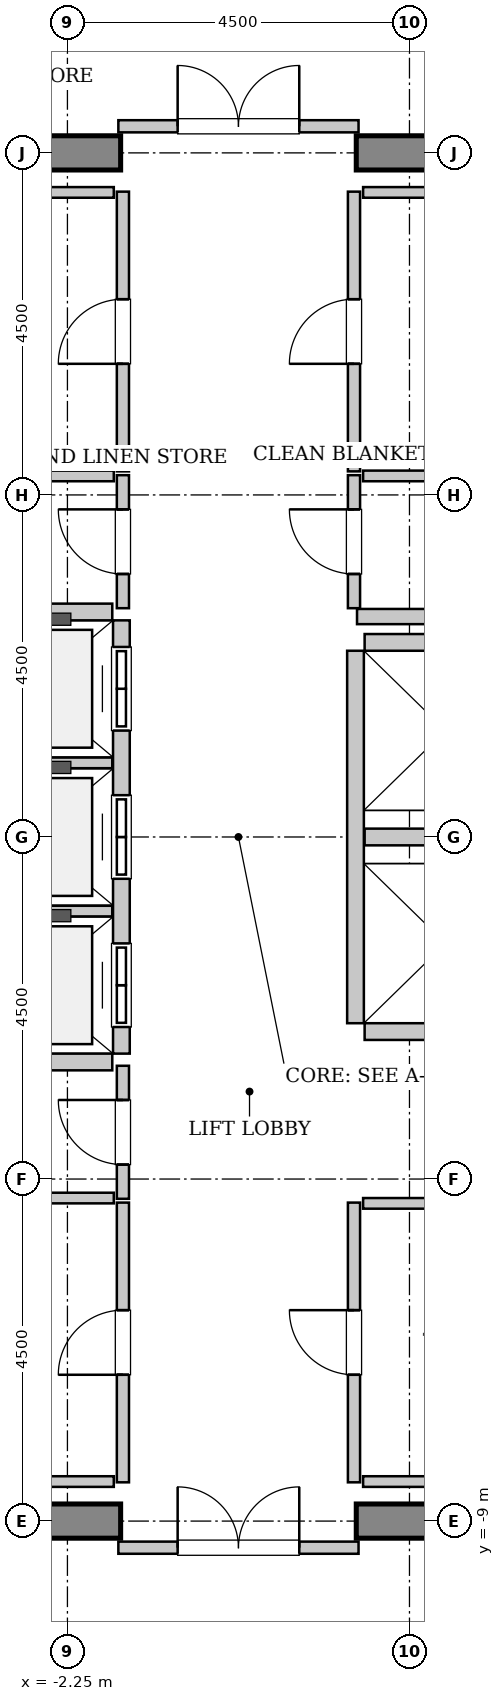
"""IFC4 building model, lengths in metres.
Left out: names, types, materials, properties, quantities, classifications, styles, units other than length and angle.
Written with IfcOpenShell. Run it as: python <this file> out.ifc"""

import sys

from ifc_helpers import new_model, si_unit, direction, frame, frame_2d, origin, place, context, subcontext, project, spatial, rectangle, extrude, source, transform, mapped, element, fill, save


model = new_model("IFC4")
c1 = context("Model", 3, precision=1e-05, world=origin(), true_north=direction((0.0, 1.0)))
c2 = subcontext(c1, "Body", "Model", "MODEL_VIEW")
j1 = project(units=[si_unit("LENGTHUNIT", "METRE"), si_unit("PLANEANGLEUNIT", "RADIAN")], contexts=[c1])
p1 = place(None, origin())
s1 = spatial("IfcSite", under=j1, at=p1, CompositionType="ELEMENT")
p2 = place(p1, origin())
s2 = spatial("IfcBuilding", under=s1, at=p2, CompositionType="ELEMENT")
p3 = place(p2, frame((0.0, 0.0, 279.8)))
s3 = spatial("IfcBuildingStorey", under=s2, at=p3, CompositionType="ELEMENT", Elevation=279.8)
m1 = source(origin(), c2, "Body", "SweptSolid", [
    extrude(rectangle(XDim=9.925, YDim=0.45, at=frame_2d((4.962, 0.0))), origin(), (0.0, 0.0, 1.0), 3.8),
])
for number, where, z_axis, x_axis in (
    (1, (-11.475, 9.0, 0.0), (0.0, 0.0, 1.0), (1.0, 0.0, 0.0)),
    (2, (1.55, 9.0, 0.0), (0.0, 0.0, 1.0), (1.0, 0.0, 0.0)),
    (3, (-11.475, -9.0, 0.0), (0.0, 0.0, 1.0), (1.0, 0.0, 0.0)),
    (4, (1.55, -9.0, 0.0), (0.0, 0.0, 1.0), (1.0, 0.0, 0.0)),
):
    element("IfcWall", number, at=place(p3, frame(where, z_axis=z_axis, x_axis=x_axis)), inside=s3, PredefinedType="SHEAR", context=c2, shape_type="MappedRepresentation", body=[
        mapped(m1, transform((0.0, 0.0, 0.0), x_axis=(1.0, 0.0, 0.0), y_axis=(0.0, 1.0, 0.0), z_axis=(0.0, 0.0, 1.0), scale=1.0)),
    ])
m2 = source(origin(), c2, "Body", "SweptSolid", [
    extrude(rectangle(XDim=5.7, YDim=0.22, at=frame_2d((2.85, 0.0))), origin(), (0.0, 0.0, 1.0), 3.535),
])
p4 = place(p3, frame((-1.54, -2.85, 0.0), z_axis=(0.0, 0.0, 1.0), x_axis=(0.0, 1.0, 0.0)))
e5 = element("IfcWall", 5, at=p4, inside=s3, PredefinedType="SOLIDWALL", context=c2, shape_type="MappedRepresentation", body=[
    mapped(m2, transform((0.0, 0.0, 0.0), x_axis=(1.0, 0.0, 0.0), y_axis=(0.0, 1.0, 0.0), z_axis=(0.0, 0.0, 1.0), scale=1.0)),
])
p5 = place(p4, frame((0.35, 0.0, 0.0)))
e6 = element("IfcOpeningElement", 6, at=p5, cuts=e5, PredefinedType="OPENING", context=c2, shape_type="SweptSolid", body=[
    extrude(rectangle(XDim=1.1, YDim=2.2, at=frame_2d((0.55, 1.1))), frame((0.0, 0.12, 0.0), z_axis=(0.0, -1.0, 0.0), x_axis=(1.0, 0.0, 0.0)), (0.0, 0.0, 1.0), 0.24),
])
p6 = place(p4, frame((2.3, 0.0, 0.0)))
e7 = element("IfcOpeningElement", 7, at=p6, cuts=e5, PredefinedType="OPENING", context=c2, shape_type="SweptSolid", body=[
    extrude(rectangle(XDim=1.1, YDim=2.2, at=frame_2d((0.55, 1.1))), frame((0.0, 0.12, 0.0), z_axis=(0.0, -1.0, 0.0), x_axis=(1.0, 0.0, 0.0)), (0.0, 0.0, 1.0), 0.24),
])
p7 = place(p4, frame((4.25, 0.0, 0.0)))
e8 = element("IfcOpeningElement", 8, at=p7, cuts=e5, PredefinedType="OPENING", context=c2, shape_type="SweptSolid", body=[
    extrude(rectangle(XDim=1.1, YDim=2.2, at=frame_2d((0.55, 1.1))), frame((0.0, 0.12, 0.0), z_axis=(0.0, -1.0, 0.0), x_axis=(1.0, 0.0, 0.0)), (0.0, 0.0, 1.0), 0.24),
])
m3 = source(origin(), c2, "Body", "SweptSolid", [
    extrude(rectangle(XDim=2.13, YDim=0.22, at=frame_2d((1.065, 0.0))), origin(), (0.0, 0.0, 1.0), 3.535),
])
p8 = place(p3, frame((-3.79, -2.96, 0.0), z_axis=(0.0, 0.0, 1.0), x_axis=(1.0, 0.0, 0.0)))
e9 = element("IfcWall", 9, at=p8, inside=s3, PredefinedType="SOLIDWALL", context=c2, shape_type="MappedRepresentation", body=[
    mapped(m3, transform((0.0, 0.0, 0.0), x_axis=(1.0, 0.0, 0.0), y_axis=(0.0, 1.0, 0.0), z_axis=(0.0, 0.0, 1.0), scale=1.0)),
])
m4 = source(origin(), c2, "Body", "SweptSolid", [
    extrude(rectangle(XDim=2.13, YDim=0.14, at=frame_2d((1.065, 0.0))), origin(), (0.0, 0.0, 1.0), 3.535),
])
for number, where, z_axis, x_axis in (
    (10, (-3.79, -0.975, 0.0), (0.0, 0.0, 1.0), (1.0, 0.0, 0.0)),
    (11, (-3.79, 0.975, 0.0), (0.0, 0.0, 1.0), (1.0, 0.0, 0.0)),
):
    element("IfcWall", number, at=place(p3, frame(where, z_axis=z_axis, x_axis=x_axis)), inside=s3, PredefinedType="PARTITIONING", context=c2, shape_type="MappedRepresentation", body=[
        mapped(m4, transform((0.0, 0.0, 0.0), x_axis=(1.0, 0.0, 0.0), y_axis=(0.0, 1.0, 0.0), z_axis=(0.0, 0.0, 1.0), scale=1.0)),
    ])
p9 = place(p3, frame((-1.66, 2.96, 0.0), z_axis=(0.0, 0.0, 1.0), x_axis=(-1.0, 0.0, 0.0)))
e12 = element("IfcWall", 12, at=p9, inside=s3, PredefinedType="SOLIDWALL", context=c2, shape_type="MappedRepresentation", body=[
    mapped(m3, transform((0.0, 0.0, 0.0), x_axis=(1.0, 0.0, 0.0), y_axis=(0.0, 1.0, 0.0), z_axis=(0.0, 0.0, 1.0), scale=1.0)),
])
m5 = source(origin(), c2, "Body", "SweptSolid", [
    extrude(rectangle(XDim=4.9, YDim=0.22, at=frame_2d((2.45, 0.0))), origin(), (0.0, 0.0, 1.0), 3.535),
])
p10 = place(p3, frame((1.54, 2.45, 0.0), z_axis=(0.0, 0.0, 1.0), x_axis=(0.0, -1.0, 0.0)))
e13 = element("IfcWall", 13, at=p10, inside=s3, PredefinedType="SOLIDWALL", context=c2, shape_type="MappedRepresentation", body=[
    mapped(m5, transform((0.0, 0.0, 0.0), x_axis=(1.0, 0.0, 0.0), y_axis=(0.0, 1.0, 0.0), z_axis=(0.0, 0.0, 1.0), scale=1.0)),
])
for number, where, z_axis, x_axis in (
    (14, (1.66, -2.56, 0.0), (0.0, 0.0, 1.0), (1.0, 0.0, 0.0)),
    (15, (1.66, 0.0, 0.0), (0.0, 0.0, 1.0), (1.0, 0.0, 0.0)),
    (16, (3.79, 2.56, 0.0), (0.0, 0.0, 1.0), (-1.0, 0.0, 0.0)),
):
    element("IfcWall", number, at=place(p3, frame(where, z_axis=z_axis, x_axis=x_axis)), inside=s3, PredefinedType="SOLIDWALL", context=c2, shape_type="MappedRepresentation", body=[
        mapped(m3, transform((0.0, 0.0, 0.0), x_axis=(1.0, 0.0, 0.0), y_axis=(0.0, 1.0, 0.0), z_axis=(0.0, 0.0, 1.0), scale=1.0)),
    ])
m6 = source(origin(), c2, "Body", "SweptSolid", [
    extrude(rectangle(XDim=2.52, YDim=0.2, at=frame_2d((1.26, 0.0))), origin(), (0.0, 0.0, 1.0), 3.535),
])
p11 = place(p3, frame((1.56, 2.9, 0.0), z_axis=(0.0, 0.0, 1.0), x_axis=(1.0, 0.0, 0.0)))
e17 = element("IfcWall", 17, at=p11, inside=s3, PredefinedType="PARTITIONING", context=c2, shape_type="MappedRepresentation", body=[
    mapped(m6, transform((0.0, 0.0, 0.0), x_axis=(1.0, 0.0, 0.0), y_axis=(0.0, 1.0, 0.0), z_axis=(0.0, 0.0, 1.0), scale=1.0)),
])
m7 = source(origin(), c2, "Body", "SweptSolid", [
    extrude(rectangle(XDim=3.16, YDim=0.16, at=frame_2d((1.58, 0.0))), origin(), (0.0, 0.0, 1.0), 2.625),
])
p12 = place(p3, frame((-1.58, 9.35, 0.0), z_axis=(0.0, 0.0, 1.0), x_axis=(1.0, 0.0, 0.0)))
e18 = element("IfcWall", 18, at=p12, inside=s3, PredefinedType="PARTITIONING", context=c2, shape_type="MappedRepresentation", body=[
    mapped(m7, transform((0.0, 0.0, 0.0), x_axis=(1.0, 0.0, 0.0), y_axis=(0.0, 1.0, 0.0), z_axis=(0.0, 0.0, 1.0), scale=1.0)),
])
p13 = place(p12, frame((0.78, 0.0, 0.0)))
e19 = element("IfcOpeningElement", 19, at=p13, cuts=e18, PredefinedType="OPENING", context=c2, shape_type="SweptSolid", body=[
    extrude(rectangle(XDim=1.6, YDim=2.3, at=frame_2d((0.8, 1.15))), frame((0.0, 0.09, 0.0), z_axis=(0.0, -1.0, 0.0), x_axis=(1.0, 0.0, 0.0)), (0.0, 0.0, 1.0), 0.18),
])
p14 = place(p3, frame((-1.58, -9.35, 0.0), z_axis=(0.0, 0.0, 1.0), x_axis=(1.0, 0.0, 0.0)))
e20 = element("IfcWall", 20, at=p14, inside=s3, PredefinedType="PARTITIONING", context=c2, shape_type="MappedRepresentation", body=[
    mapped(m7, transform((0.0, 0.0, 0.0), x_axis=(1.0, 0.0, 0.0), y_axis=(0.0, 1.0, 0.0), z_axis=(0.0, 0.0, 1.0), scale=1.0)),
])
p15 = place(p14, frame((0.78, 0.0, 0.0)))
e21 = element("IfcOpeningElement", 21, at=p15, cuts=e20, PredefinedType="OPENING", context=c2, shape_type="SweptSolid", body=[
    extrude(rectangle(XDim=1.6, YDim=2.3, at=frame_2d((0.8, 1.15))), frame((0.0, 0.09, 0.0), z_axis=(0.0, -1.0, 0.0), x_axis=(1.0, 0.0, 0.0)), (0.0, 0.0, 1.0), 0.18),
])
m8 = source(origin(), c2, "Body", "SweptSolid", [
    extrude(rectangle(XDim=1.75, YDim=0.16, at=frame_2d((0.875, 0.0))), origin(), (0.0, 0.0, 1.0), 3.535),
])
p16 = place(p3, frame((-1.52, 3.01, 0.0), z_axis=(0.0, 0.0, 1.0), x_axis=(0.0, 1.0, 0.0)))
e22 = element("IfcWall", 22, at=p16, inside=s3, PredefinedType="PARTITIONING", context=c2, shape_type="MappedRepresentation", body=[
    mapped(m8, transform((0.0, 0.0, 0.0), x_axis=(1.0, 0.0, 0.0), y_axis=(0.0, 1.0, 0.0), z_axis=(0.0, 0.0, 1.0), scale=1.0)),
])
p17 = place(p16, frame((0.45, 0.0, 0.0)))
e23 = element("IfcOpeningElement", 23, at=p17, cuts=e22, PredefinedType="OPENING", context=c2, shape_type="SweptSolid", body=[
    extrude(rectangle(XDim=0.85, YDim=2.1, at=frame_2d((0.425, 1.05))), frame((0.0, 0.09, 0.0), z_axis=(0.0, -1.0, 0.0), x_axis=(1.0, 0.0, 0.0)), (0.0, 0.0, 1.0), 0.18),
])
m9 = source(origin(), c2, "Body", "SweptSolid", [
    extrude(rectangle(XDim=2.95, YDim=0.14, at=frame_2d((1.475, 0.0))), origin(), (0.0, 0.0, 1.0), 3.535),
])
p18 = place(p3, frame((-4.59, 4.75, 0.0), z_axis=(0.0, 0.0, 1.0), x_axis=(1.0, 0.0, 0.0)))
e24 = element("IfcWall", 24, at=p18, inside=s3, PredefinedType="PARTITIONING", context=c2, shape_type="MappedRepresentation", body=[
    mapped(m9, transform((0.0, 0.0, 0.0), x_axis=(1.0, 0.0, 0.0), y_axis=(0.0, 1.0, 0.0), z_axis=(0.0, 0.0, 1.0), scale=1.0)),
])
m10 = source(origin(), c2, "Body", "SweptSolid", [
    extrude(rectangle(XDim=3.68, YDim=0.16, at=frame_2d((1.84, 0.0))), origin(), (0.0, 0.0, 1.0), 3.535),
])
p19 = place(p3, frame((-1.52, 4.81, 0.0), z_axis=(0.0, 0.0, 1.0), x_axis=(0.0, 1.0, 0.0)))
e25 = element("IfcWall", 25, at=p19, inside=s3, PredefinedType="PARTITIONING", context=c2, shape_type="MappedRepresentation", body=[
    mapped(m10, transform((0.0, 0.0, 0.0), x_axis=(1.0, 0.0, 0.0), y_axis=(0.0, 1.0, 0.0), z_axis=(0.0, 0.0, 1.0), scale=1.0)),
])
p20 = place(p19, frame((1.415, 0.0, 0.0)))
e26 = element("IfcOpeningElement", 26, at=p20, cuts=e25, PredefinedType="OPENING", context=c2, shape_type="SweptSolid", body=[
    extrude(rectangle(XDim=0.85, YDim=2.1, at=frame_2d((0.425, 1.05))), frame((0.0, 0.09, 0.0), z_axis=(0.0, -1.0, 0.0), x_axis=(1.0, 0.0, 0.0)), (0.0, 0.0, 1.0), 0.18),
])
m11 = source(origin(), c2, "Body", "SweptSolid", [
    extrude(rectangle(XDim=3.15, YDim=0.14, at=frame_2d((1.575, 0.0))), origin(), (0.0, 0.0, 1.0), 3.535),
])
p21 = place(p3, frame((-4.79, 8.48, 0.0), z_axis=(0.0, 0.0, 1.0), x_axis=(1.0, 0.0, 0.0)))
e27 = element("IfcWall", 27, at=p21, inside=s3, PredefinedType="PARTITIONING", context=c2, shape_type="MappedRepresentation", body=[
    mapped(m11, transform((0.0, 0.0, 0.0), x_axis=(1.0, 0.0, 0.0), y_axis=(0.0, 1.0, 0.0), z_axis=(0.0, 0.0, 1.0), scale=1.0)),
])
p22 = place(p3, frame((1.52, 3.01, 0.0), z_axis=(0.0, 0.0, 1.0), x_axis=(0.0, 1.0, 0.0)))
e28 = element("IfcWall", 28, at=p22, inside=s3, PredefinedType="PARTITIONING", context=c2, shape_type="MappedRepresentation", body=[
    mapped(m8, transform((0.0, 0.0, 0.0), x_axis=(1.0, 0.0, 0.0), y_axis=(0.0, 1.0, 0.0), z_axis=(0.0, 0.0, 1.0), scale=1.0)),
])
p23 = place(p22, frame((0.45, 0.0, 0.0)))
e29 = element("IfcOpeningElement", 29, at=p23, cuts=e28, PredefinedType="OPENING", context=c2, shape_type="SweptSolid", body=[
    extrude(rectangle(XDim=0.85, YDim=2.1, at=frame_2d((0.425, 1.05))), frame((0.0, 0.09, 0.0), z_axis=(0.0, -1.0, 0.0), x_axis=(1.0, 0.0, 0.0)), (0.0, 0.0, 1.0), 0.18),
])
p24 = place(p3, frame((1.64, 4.75, 0.0), z_axis=(0.0, 0.0, 1.0), x_axis=(1.0, 0.0, 0.0)))
e30 = element("IfcWall", 30, at=p24, inside=s3, PredefinedType="PARTITIONING", context=c2, shape_type="MappedRepresentation", body=[
    mapped(m11, transform((0.0, 0.0, 0.0), x_axis=(1.0, 0.0, 0.0), y_axis=(0.0, 1.0, 0.0), z_axis=(0.0, 0.0, 1.0), scale=1.0)),
])
p25 = place(p3, frame((1.52, 4.81, 0.0), z_axis=(0.0, 0.0, 1.0), x_axis=(0.0, 1.0, 0.0)))
e31 = element("IfcWall", 31, at=p25, inside=s3, PredefinedType="PARTITIONING", context=c2, shape_type="MappedRepresentation", body=[
    mapped(m10, transform((0.0, 0.0, 0.0), x_axis=(1.0, 0.0, 0.0), y_axis=(0.0, 1.0, 0.0), z_axis=(0.0, 0.0, 1.0), scale=1.0)),
])
p26 = place(p25, frame((1.415, 0.0, 0.0)))
e32 = element("IfcOpeningElement", 32, at=p26, cuts=e31, PredefinedType="OPENING", context=c2, shape_type="SweptSolid", body=[
    extrude(rectangle(XDim=0.85, YDim=2.1, at=frame_2d((0.425, 1.05))), frame((0.0, 0.09, 0.0), z_axis=(0.0, -1.0, 0.0), x_axis=(1.0, 0.0, 0.0)), (0.0, 0.0, 1.0), 0.18),
])
p27 = place(p3, frame((1.64, 8.48, 0.0), z_axis=(0.0, 0.0, 1.0), x_axis=(1.0, 0.0, 0.0)))
e33 = element("IfcWall", 33, at=p27, inside=s3, PredefinedType="PARTITIONING", context=c2, shape_type="MappedRepresentation", body=[
    mapped(m11, transform((0.0, 0.0, 0.0), x_axis=(1.0, 0.0, 0.0), y_axis=(0.0, 1.0, 0.0), z_axis=(0.0, 0.0, 1.0), scale=1.0)),
])
p28 = place(p3, frame((-1.52, -4.76, 0.0), z_axis=(0.0, 0.0, 1.0), x_axis=(0.0, 1.0, 0.0)))
e34 = element("IfcWall", 34, at=p28, inside=s3, PredefinedType="PARTITIONING", context=c2, shape_type="MappedRepresentation", body=[
    mapped(m8, transform((0.0, 0.0, 0.0), x_axis=(1.0, 0.0, 0.0), y_axis=(0.0, 1.0, 0.0), z_axis=(0.0, 0.0, 1.0), scale=1.0)),
])
p29 = place(p28, frame((0.45, 0.0, 0.0)))
e35 = element("IfcOpeningElement", 35, at=p29, cuts=e34, PredefinedType="OPENING", context=c2, shape_type="SweptSolid", body=[
    extrude(rectangle(XDim=0.85, YDim=2.1, at=frame_2d((0.425, 1.05))), frame((0.0, 0.09, 0.0), z_axis=(0.0, -1.0, 0.0), x_axis=(1.0, 0.0, 0.0)), (0.0, 0.0, 1.0), 0.18),
])
p30 = place(p3, frame((-4.79, -4.75, 0.0), z_axis=(0.0, 0.0, 1.0), x_axis=(1.0, 0.0, 0.0)))
e36 = element("IfcWall", 36, at=p30, inside=s3, PredefinedType="PARTITIONING", context=c2, shape_type="MappedRepresentation", body=[
    mapped(m11, transform((0.0, 0.0, 0.0), x_axis=(1.0, 0.0, 0.0), y_axis=(0.0, 1.0, 0.0), z_axis=(0.0, 0.0, 1.0), scale=1.0)),
])
p31 = place(p3, frame((-1.52, -8.49, 0.0), z_axis=(0.0, 0.0, 1.0), x_axis=(0.0, 1.0, 0.0)))
e37 = element("IfcWall", 37, at=p31, inside=s3, PredefinedType="PARTITIONING", context=c2, shape_type="MappedRepresentation", body=[
    mapped(m10, transform((0.0, 0.0, 0.0), x_axis=(1.0, 0.0, 0.0), y_axis=(0.0, 1.0, 0.0), z_axis=(0.0, 0.0, 1.0), scale=1.0)),
])
p32 = place(p31, frame((1.415, 0.0, 0.0)))
e38 = element("IfcOpeningElement", 38, at=p32, cuts=e37, PredefinedType="OPENING", context=c2, shape_type="SweptSolid", body=[
    extrude(rectangle(XDim=0.85, YDim=2.1, at=frame_2d((0.425, 1.05))), frame((0.0, 0.09, 0.0), z_axis=(0.0, -1.0, 0.0), x_axis=(1.0, 0.0, 0.0)), (0.0, 0.0, 1.0), 0.18),
])
m12 = source(origin(), c2, "Body", "SweptSolid", [
    extrude(rectangle(XDim=3.03, YDim=0.14, at=frame_2d((1.515, 0.0))), origin(), (0.0, 0.0, 1.0), 3.535),
])
p33 = place(p3, frame((-4.67, -8.48, 0.0), z_axis=(0.0, 0.0, 1.0), x_axis=(1.0, 0.0, 0.0)))
e39 = element("IfcWall", 39, at=p33, inside=s3, PredefinedType="PARTITIONING", context=c2, shape_type="MappedRepresentation", body=[
    mapped(m12, transform((0.0, 0.0, 0.0), x_axis=(1.0, 0.0, 0.0), y_axis=(0.0, 1.0, 0.0), z_axis=(0.0, 0.0, 1.0), scale=1.0)),
])
p34 = place(p3, frame((1.52, -8.49, 0.0), z_axis=(0.0, 0.0, 1.0), x_axis=(0.0, 1.0, 0.0)))
e40 = element("IfcWall", 40, at=p34, inside=s3, PredefinedType="PARTITIONING", context=c2, shape_type="MappedRepresentation", body=[
    mapped(m10, transform((0.0, 0.0, 0.0), x_axis=(1.0, 0.0, 0.0), y_axis=(0.0, 1.0, 0.0), z_axis=(0.0, 0.0, 1.0), scale=1.0)),
])
p35 = place(p34, frame((1.415, 0.0, 0.0)))
e41 = element("IfcOpeningElement", 41, at=p35, cuts=e40, PredefinedType="OPENING", context=c2, shape_type="SweptSolid", body=[
    extrude(rectangle(XDim=0.85, YDim=2.1, at=frame_2d((0.425, 1.05))), frame((0.0, 0.09, 0.0), z_axis=(0.0, -1.0, 0.0), x_axis=(1.0, 0.0, 0.0)), (0.0, 0.0, 1.0), 0.18),
])
p36 = place(p3, frame((1.64, -4.82, 0.0), z_axis=(0.0, 0.0, 1.0), x_axis=(1.0, 0.0, 0.0)))
e42 = element("IfcWall", 42, at=p36, inside=s3, PredefinedType="PARTITIONING", context=c2, shape_type="MappedRepresentation", body=[
    mapped(m9, transform((0.0, 0.0, 0.0), x_axis=(1.0, 0.0, 0.0), y_axis=(0.0, 1.0, 0.0), z_axis=(0.0, 0.0, 1.0), scale=1.0)),
])
p37 = place(p3, frame((1.64, -8.48, 0.0), z_axis=(0.0, 0.0, 1.0), x_axis=(1.0, 0.0, 0.0)))
e43 = element("IfcWall", 43, at=p37, inside=s3, PredefinedType="PARTITIONING", context=c2, shape_type="MappedRepresentation", body=[
    mapped(m11, transform((0.0, 0.0, 0.0), x_axis=(1.0, 0.0, 0.0), y_axis=(0.0, 1.0, 0.0), z_axis=(0.0, 0.0, 1.0), scale=1.0)),
])
m13 = source(origin(), c2, "Body", "SweptSolid", [
    extrude(rectangle(XDim=1.1, YDim=2.2, at=frame_2d((0.55, 1.1))), frame((0.0, 0.025, 0.0), z_axis=(0.0, -1.0, 0.0), x_axis=(1.0, 0.0, 0.0)), (0.0, 0.0, 1.0), 0.05),
])
p38 = place(p5, origin())
e44 = element("IfcDoor", 44, at=p38, inside=s3, OperationType="DOUBLE_DOOR_SLIDING", PredefinedType="DOOR", context=c2, shape_type="MappedRepresentation", body=[
    mapped(m13, transform((0.0, 0.0, 0.0), x_axis=(1.0, 0.0, 0.0), y_axis=(0.0, 1.0, 0.0), z_axis=(0.0, 0.0, 1.0), scale=1.0)),
])
fill(e6, e44)
p39 = place(p6, origin())
e45 = element("IfcDoor", 45, at=p39, inside=s3, OperationType="DOUBLE_DOOR_SLIDING", PredefinedType="DOOR", context=c2, shape_type="MappedRepresentation", body=[
    mapped(m13, transform((0.0, 0.0, 0.0), x_axis=(1.0, 0.0, 0.0), y_axis=(0.0, 1.0, 0.0), z_axis=(0.0, 0.0, 1.0), scale=1.0)),
])
fill(e7, e45)
p40 = place(p7, origin())
e46 = element("IfcDoor", 46, at=p40, inside=s3, OperationType="DOUBLE_DOOR_SLIDING", PredefinedType="DOOR", context=c2, shape_type="MappedRepresentation", body=[
    mapped(m13, transform((0.0, 0.0, 0.0), x_axis=(1.0, 0.0, 0.0), y_axis=(0.0, 1.0, 0.0), z_axis=(0.0, 0.0, 1.0), scale=1.0)),
])
fill(e8, e46)
m14 = source(origin(), c2, "Body", "SweptSolid", [
    extrude(rectangle(XDim=1.6, YDim=2.3, at=frame_2d((0.8, 1.15))), frame((0.0, 0.025, 0.0), z_axis=(0.0, -1.0, 0.0), x_axis=(1.0, 0.0, 0.0)), (0.0, 0.0, 1.0), 0.05),
])
p41 = place(p13, origin())
e47 = element("IfcDoor", 47, at=p41, inside=s3, OperationType="DOUBLE_DOOR_SINGLE_SWING", PredefinedType="DOOR", context=c2, shape_type="MappedRepresentation", body=[
    mapped(m14, transform((0.0, 0.0, 0.0), x_axis=(1.0, 0.0, 0.0), y_axis=(0.0, 1.0, 0.0), z_axis=(0.0, 0.0, 1.0), scale=1.0)),
])
fill(e19, e47)
p42 = place(p15, origin())
e48 = element("IfcDoor", 48, at=p42, inside=s3, OperationType="DOUBLE_DOOR_SINGLE_SWING", PredefinedType="DOOR", context=c2, shape_type="MappedRepresentation", body=[
    mapped(m14, transform((0.0, 0.0, 0.0), x_axis=(1.0, 0.0, 0.0), y_axis=(0.0, 1.0, 0.0), z_axis=(0.0, 0.0, 1.0), scale=1.0)),
])
fill(e21, e48)
m15 = source(origin(), c2, "Body", "SweptSolid", [
    extrude(rectangle(XDim=0.85, YDim=2.1, at=frame_2d((0.425, 1.05))), frame((0.0, 0.025, 0.0), z_axis=(0.0, -1.0, 0.0), x_axis=(1.0, 0.0, 0.0)), (0.0, 0.0, 1.0), 0.05),
])
p43 = place(p17, origin())
e49 = element("IfcDoor", 49, at=p43, inside=s3, OperationType="SINGLE_SWING_RIGHT", PredefinedType="DOOR", context=c2, shape_type="MappedRepresentation", body=[
    mapped(m15, transform((0.0, 0.0, 0.0), x_axis=(1.0, 0.0, 0.0), y_axis=(0.0, 1.0, 0.0), z_axis=(0.0, 0.0, 1.0), scale=1.0)),
])
fill(e23, e49)
p44 = place(p20, origin())
e50 = element("IfcDoor", 50, at=p44, inside=s3, OperationType="SINGLE_SWING_LEFT", PredefinedType="DOOR", context=c2, shape_type="MappedRepresentation", body=[
    mapped(m15, transform((0.0, 0.0, 0.0), x_axis=(1.0, 0.0, 0.0), y_axis=(0.0, 1.0, 0.0), z_axis=(0.0, 0.0, 1.0), scale=1.0)),
])
fill(e26, e50)
p45 = place(p23, origin())
e51 = element("IfcDoor", 51, at=p45, inside=s3, OperationType="SINGLE_SWING_RIGHT", PredefinedType="DOOR", context=c2, shape_type="MappedRepresentation", body=[
    mapped(m15, transform((0.0, 0.0, 0.0), x_axis=(1.0, 0.0, 0.0), y_axis=(0.0, 1.0, 0.0), z_axis=(0.0, 0.0, 1.0), scale=1.0)),
])
fill(e29, e51)
p46 = place(p26, origin())
e52 = element("IfcDoor", 52, at=p46, inside=s3, OperationType="SINGLE_SWING_LEFT", PredefinedType="DOOR", context=c2, shape_type="MappedRepresentation", body=[
    mapped(m15, transform((0.0, 0.0, 0.0), x_axis=(1.0, 0.0, 0.0), y_axis=(0.0, 1.0, 0.0), z_axis=(0.0, 0.0, 1.0), scale=1.0)),
])
fill(e32, e52)
p47 = place(p29, origin())
e53 = element("IfcDoor", 53, at=p47, inside=s3, OperationType="SINGLE_SWING_RIGHT", PredefinedType="DOOR", context=c2, shape_type="MappedRepresentation", body=[
    mapped(m15, transform((0.0, 0.0, 0.0), x_axis=(1.0, 0.0, 0.0), y_axis=(0.0, 1.0, 0.0), z_axis=(0.0, 0.0, 1.0), scale=1.0)),
])
fill(e35, e53)
p48 = place(p32, origin())
e54 = element("IfcDoor", 54, at=p48, inside=s3, OperationType="SINGLE_SWING_LEFT", PredefinedType="DOOR", context=c2, shape_type="MappedRepresentation", body=[
    mapped(m15, transform((0.0, 0.0, 0.0), x_axis=(1.0, 0.0, 0.0), y_axis=(0.0, 1.0, 0.0), z_axis=(0.0, 0.0, 1.0), scale=1.0)),
])
fill(e38, e54)
p49 = place(p35, origin())
e55 = element("IfcDoor", 55, at=p49, inside=s3, OperationType="SINGLE_SWING_RIGHT", PredefinedType="DOOR", context=c2, shape_type="MappedRepresentation", body=[
    mapped(m15, transform((0.0, 0.0, 0.0), x_axis=(1.0, 0.0, 0.0), y_axis=(0.0, 1.0, 0.0), z_axis=(0.0, 0.0, 1.0), scale=1.0)),
])
fill(e41, e55)
save(model, sys.argv[1])
